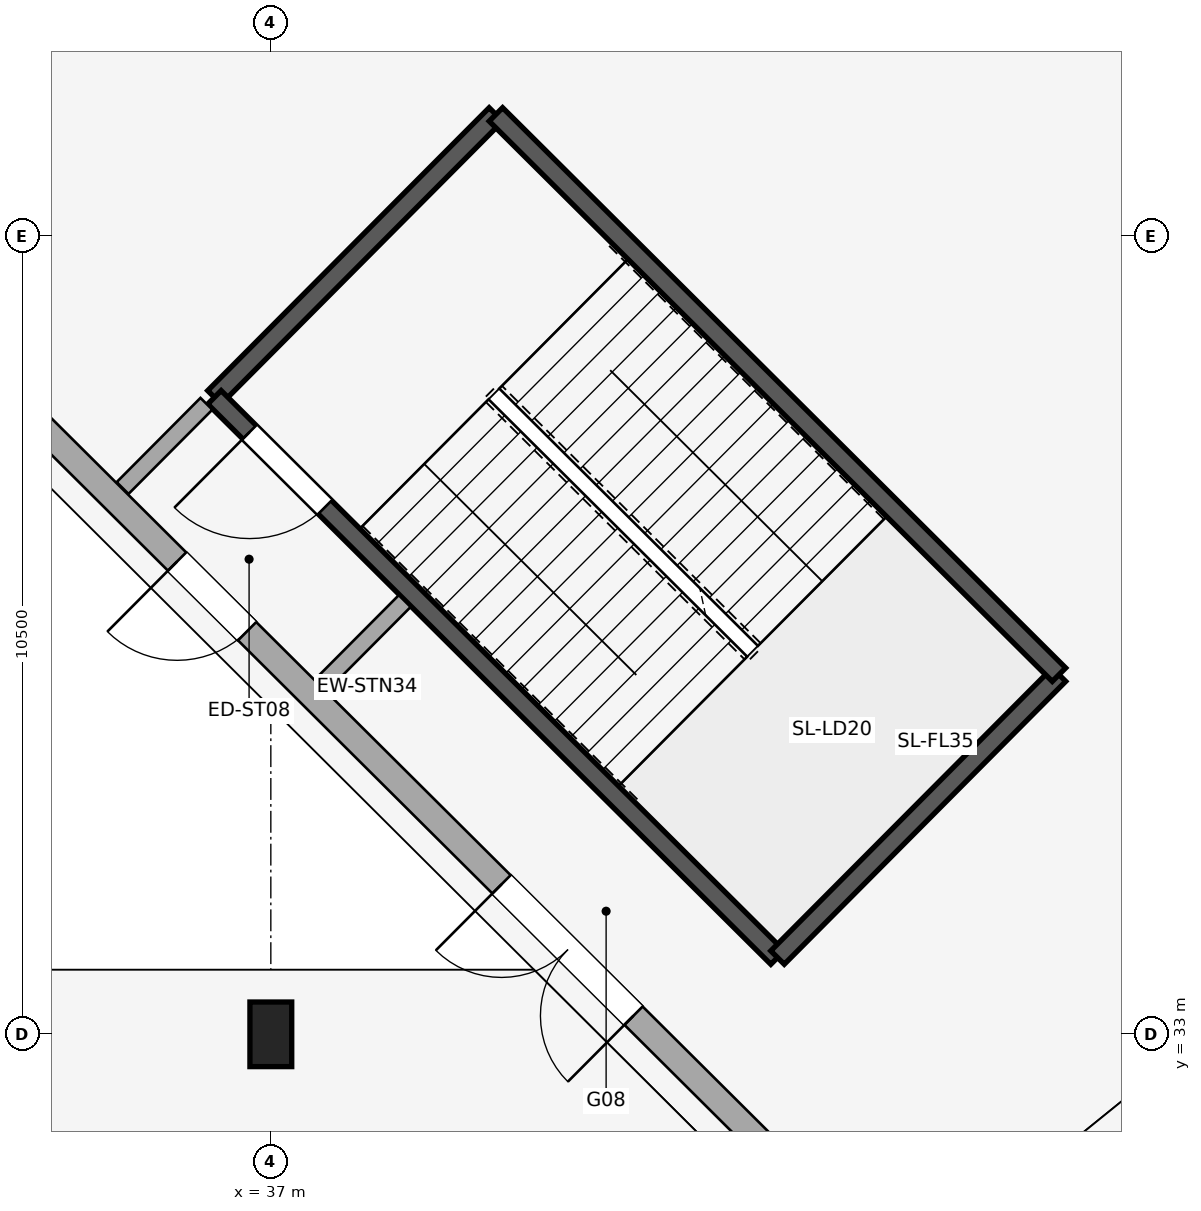
"""IFC4 building model, lengths in metres.
Left out: names, types, materials, properties, quantities, classifications, styles, units other than length and angle.
Written with IfcOpenShell. Run it as: python <this file> out.ifc"""

import sys

from ifc_helpers import new_model, si_unit, direction, frame, frame_2d, origin, origin_2d, place, context, subcontext, project, spatial, rectangle, extrude, element, fill, save


model = new_model("IFC4")
c1 = context("Model", 3, precision=1e-05, world=origin(), true_north=direction((0.0, 1.0)))
c2 = subcontext(c1, "Body", "Model", "MODEL_VIEW")
j1 = project(units=[si_unit("LENGTHUNIT", "METRE"), si_unit("PLANEANGLEUNIT", "RADIAN")], contexts=[c1])
p1 = place(None, origin())
s1 = spatial("IfcSite", under=j1, at=p1, CompositionType="ELEMENT")
p2 = place(p1, origin())
s2 = spatial("IfcBuilding", under=s1, at=p2, CompositionType="ELEMENT")
p3 = place(p2, origin())
s3 = spatial("IfcBuildingStorey", under=s2, at=p3, CompositionType="ELEMENT", Elevation=0.0)
p4 = place(p3, frame((37.0, 33.0, 0.0), z_axis=(0.0, 0.0, 1.0), x_axis=(1.0, 0.0, 0.0)))
e1 = element("IfcColumn", 1, at=p4, inside=s3, PredefinedType="PILASTER", context=c2, shape_type="SweptSolid", body=[
    extrude(rectangle(XDim=0.55, YDim=0.85, at=origin_2d()), origin(), (0.0, 0.0, 1.0), 5.4),
])
p5 = place(p3, frame((30.786, 44.176, 0.0), z_axis=(0.0, 0.0, 1.0), x_axis=(0.708905356977, -0.705303618911, 0.0)))
e2 = element("IfcWall", 2, at=p5, inside=s3, PredefinedType="STANDARD", context=c2, shape_type="SweptSolid", body=[
    extrude(rectangle(XDim=19.928, YDim=0.34, at=frame_2d((9.964, 0.0))), origin(), (0.0, 0.0, 1.0), 3.85),
])
p6 = place(p5, frame((7.026, 0.0, 0.0)))
e3 = element("IfcOpeningElement", 3, at=p6, cuts=e2, PredefinedType="OPENING", context=c2, shape_type="SweptSolid", body=[
    extrude(rectangle(XDim=1.3, YDim=2.2, at=frame_2d((0.65, 1.1))), frame((0.0, 0.18, 0.0), z_axis=(0.0, -1.0, 0.0), x_axis=(1.0, 0.0, 0.0)), (0.0, 0.0, 1.0), 0.36),
])
p7 = place(p5, frame((13.047, 0.0, 0.0)))
e4 = element("IfcOpeningElement", 4, at=p7, cuts=e2, PredefinedType="OPENING", context=c2, shape_type="SweptSolid", body=[
    extrude(rectangle(XDim=2.45, YDim=2.4, at=frame_2d((1.225, 1.2))), frame((0.0, 0.18, 0.0), z_axis=(0.0, -1.0, 0.0), x_axis=(1.0, 0.0, 0.0)), (0.0, 0.0, 1.0), 0.36),
])
p8 = place(p3, frame((39.961, 45.102, 0.0), z_axis=(0.0, 0.0, 1.0), x_axis=(-0.705314141126, -0.708894888067, 0.0)))
e5 = element("IfcWall", 5, at=p8, inside=s3, PredefinedType="SHEAR", context=c2, shape_type="SweptSolid", body=[
    extrude(rectangle(XDim=5.25, YDim=0.25, at=frame_2d((2.625, 0.0))), origin(), (0.0, 0.0, 1.0), 5.1),
])
p9 = place(p3, frame((36.258, 41.38, 0.0), z_axis=(0.0, 0.0, 1.0), x_axis=(0.708891762409, -0.705317282639, 0.0)))
e6 = element("IfcWall", 6, at=p9, inside=s3, PredefinedType="SHEAR", context=c2, shape_type="SweptSolid", body=[
    extrude(rectangle(XDim=10.45, YDim=0.25, at=frame_2d((5.225, 0.0))), origin(), (0.0, 0.0, 1.0), 5.1),
])
p10 = place(p9, frame((0.65, 0.0, 0.0)))
e7 = element("IfcOpeningElement", 7, at=p10, cuts=e6, PredefinedType="OPENING", context=c2, shape_type="SweptSolid", body=[
    extrude(rectangle(XDim=1.4, YDim=2.2, at=frame_2d((0.7, 1.1))), frame((0.0, 0.135, 0.0), z_axis=(0.0, -1.0, 0.0), x_axis=(1.0, 0.0, 0.0)), (0.0, 0.0, 1.0), 0.27),
])
p11 = place(p3, frame((43.666, 34.01, 0.0), z_axis=(0.0, 0.0, 1.0), x_axis=(0.705314141126, 0.708894888067, 0.0)))
e8 = element("IfcWall", 8, at=p11, inside=s3, PredefinedType="SHEAR", context=c2, shape_type="SweptSolid", body=[
    extrude(rectangle(XDim=5.25, YDim=0.25, at=frame_2d((2.625, 0.0))), origin(), (0.0, 0.0, 1.0), 5.1),
])
p12 = place(p3, frame((47.369, 37.731, 0.0), z_axis=(0.0, 0.0, 1.0), x_axis=(-0.708891762409, 0.705317282639, 0.0)))
e9 = element("IfcWall", 9, at=p12, inside=s3, PredefinedType="SHEAR", context=c2, shape_type="SweptSolid", body=[
    extrude(rectangle(XDim=10.45, YDim=0.25, at=frame_2d((5.225, 0.0))), origin(), (0.0, 0.0, 1.0), 5.1),
])
p13 = place(p3, frame((36.152, 41.295, 0.0), z_axis=(0.0, 0.0, 1.0), x_axis=(-0.705308431296, -0.70890056901, 0.0)))
e10 = element("IfcWall", 10, at=p13, inside=s3, PredefinedType="PARTITIONING", context=c2, shape_type="SweptSolid", body=[
    extrude(rectangle(XDim=1.563, YDim=0.22, at=frame_2d((0.782, 0.0))), origin(), (0.0, 0.0, 1.0), 3.69),
])
p14 = place(p3, frame((38.761, 38.7, 0.0), z_axis=(0.0, 0.0, 1.0), x_axis=(-0.70523034672, -0.70897824936, 0.0)))
e11 = element("IfcWall", 11, at=p14, inside=s3, PredefinedType="PARTITIONING", context=c2, shape_type="SweptSolid", body=[
    extrude(rectangle(XDim=1.563, YDim=0.22, at=frame_2d((0.782, 0.0))), origin(), (0.0, 0.0, 1.0), 3.69),
])
p15 = place(p3, frame((46.187, 49.225, 0.0), z_axis=(0.0, 0.0, 1.0), x_axis=(0.721482024723, -0.692433165007, 0.0)))
e12 = element("IfcWall", 12, at=p15, inside=s3, PredefinedType="PARTITIONING", context=c2, shape_type="SweptSolid", body=[
    extrude(rectangle(XDim=15.557, YDim=0.14, at=frame_2d((7.778, 0.0))), origin(), (0.0, 0.0, 1.0), 3.69),
])
p16 = place(p6, frame((1.3, 0.0, 0.0), z_axis=(0.0, 0.0, 1.0), x_axis=(-1.0, 0.0, 0.0)))
e13 = element("IfcDoor", 13, at=p16, inside=s3, OperationType="SINGLE_SWING_RIGHT", PredefinedType="DOOR", context=c2, shape_type="SweptSolid", body=[
    extrude(rectangle(XDim=1.3, YDim=2.2, at=frame_2d((0.65, 1.1))), frame((0.0, 0.025, 0.0), z_axis=(0.0, -1.0, 0.0), x_axis=(1.0, 0.0, 0.0)), (0.0, 0.0, 1.0), 0.05),
])
fill(e3, e13)
p17 = place(p7, frame((2.45, 0.0, 0.0), z_axis=(0.0, 0.0, 1.0), x_axis=(-1.0, 0.0, 0.0)))
e14 = element("IfcDoor", 14, at=p17, inside=s3, OperationType="DOUBLE_DOOR_SINGLE_SWING", PredefinedType="DOOR", context=c2, shape_type="SweptSolid", body=[
    extrude(rectangle(XDim=2.45, YDim=2.4, at=frame_2d((1.225, 1.2))), frame((0.0, 0.025, 0.0), z_axis=(0.0, -1.0, 0.0), x_axis=(1.0, 0.0, 0.0)), (0.0, 0.0, 1.0), 0.05),
])
fill(e4, e14)
p18 = place(p10, frame((1.4, 0.0, 0.0), z_axis=(0.0, 0.0, 1.0), x_axis=(-1.0, 0.0, 0.0)))
e15 = element("IfcDoor", 15, at=p18, inside=s3, OperationType="SINGLE_SWING_RIGHT", PredefinedType="DOOR", context=c2, shape_type="SweptSolid", body=[
    extrude(rectangle(XDim=1.4, YDim=2.2, at=frame_2d((0.7, 1.1))), frame((0.0, 0.025, 0.0), z_axis=(0.0, -1.0, 0.0), x_axis=(1.0, 0.0, 0.0)), (0.0, 0.0, 1.0), 0.05),
])
fill(e7, e15)
save(model, sys.argv[1])
